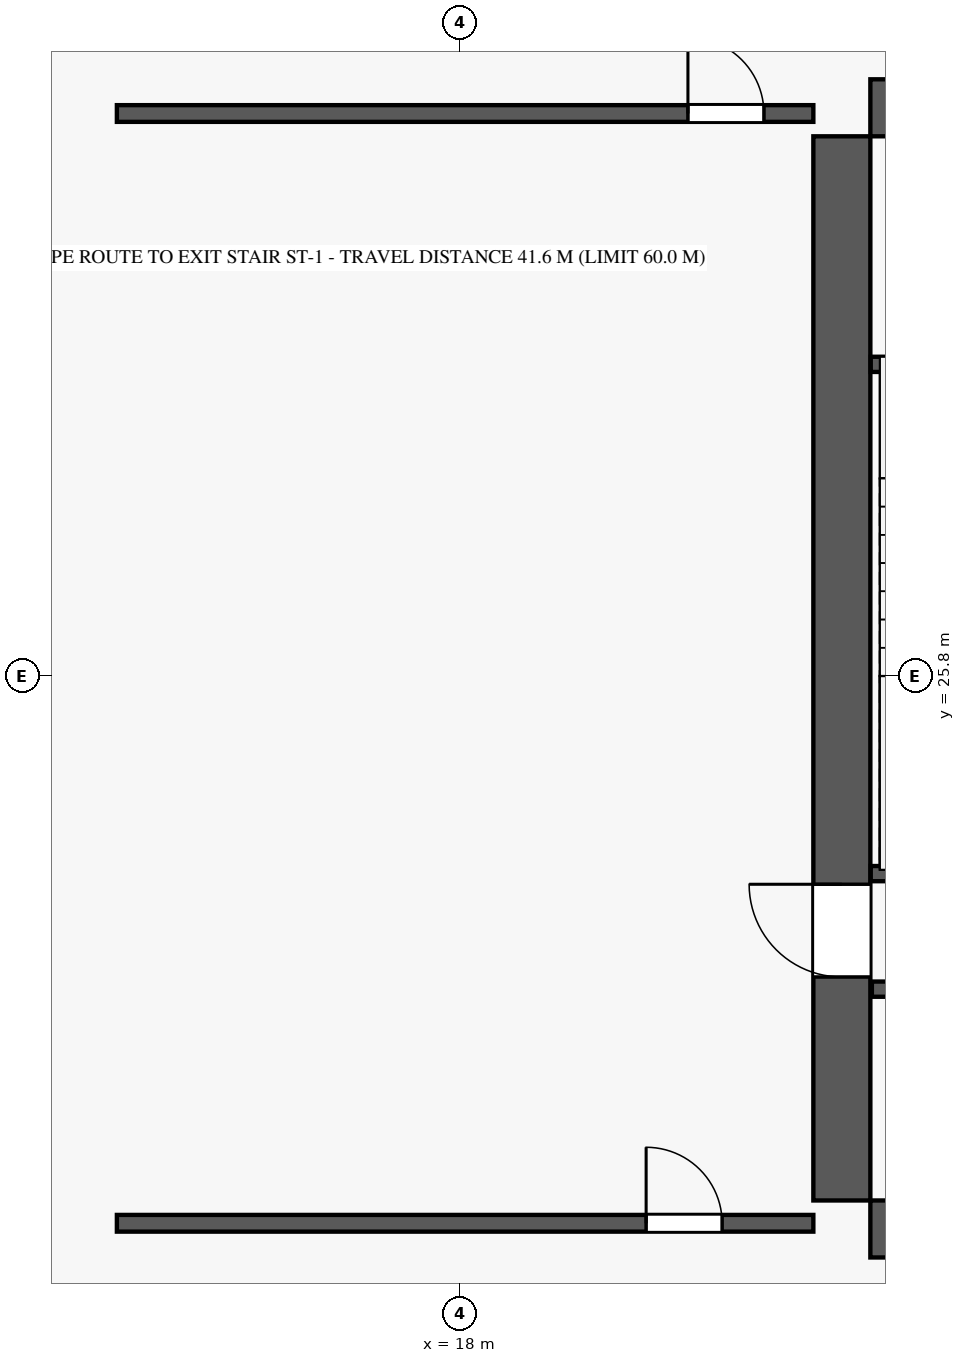
"""IFC4 building model, lengths in metres.
Left out: names, types, materials, properties, quantities, classifications, styles, units other than length and angle.
Written with IfcOpenShell. Run it as: python <this file> out.ifc"""

import sys

from ifc_helpers import new_model, si_unit, direction, frame, frame_2d, origin, origin_2d, place, context, subcontext, project, spatial, rectangle, extrude, element, fill, save


model = new_model("IFC4")
c1 = context("Model", 3, precision=1e-05, world=origin(), true_north=direction((0.0, 1.0)))
c2 = subcontext(c1, "Body", "Model", "MODEL_VIEW")
j1 = project(units=[si_unit("LENGTHUNIT", "METRE"), si_unit("PLANEANGLEUNIT", "RADIAN")], contexts=[c1])
p1 = place(None, origin())
s1 = spatial("IfcSite", under=j1, at=p1, CompositionType="ELEMENT")
p2 = place(p1, origin())
s2 = spatial("IfcBuilding", under=s1, at=p2, CompositionType="ELEMENT")
p3 = place(p2, frame((0.0, 0.0, 148.1)))
s3 = spatial("IfcBuildingStorey", under=s2, at=p3, CompositionType="ELEMENT", Elevation=148.1)
for number, where, z_axis, x_axis in (
    (1, (23.025, 18.525, 0.0), (0.0, 0.0, 1.0), (1.0, 0.0, 0.0)),
    (2, (23.025, 33.275, 0.0), (0.0, 0.0, 1.0), (1.0, 0.0, 0.0)),
):
    element("IfcColumn", number, at=place(p3, frame(where, z_axis=z_axis, x_axis=x_axis)), inside=s3, PredefinedType="COLUMN", context=c2, shape_type="SweptSolid", body=[
        extrude(rectangle(XDim=0.75, YDim=0.75, at=origin_2d()), origin(), (0.0, 0.0, 1.0), 5.4),
    ])
for number, where, z_axis, x_axis in (
    (3, (23.4, 18.525, 0.0), (0.0, 0.0, 1.0), (1.0, 0.0, 0.0)),
    (4, (23.4, 33.275, 0.0), (0.0, 0.0, 1.0), (1.0, 0.0, 0.0)),
):
    element("IfcWall", number, at=place(p3, frame(where, z_axis=z_axis, x_axis=x_axis)), inside=s3, PredefinedType="SHEAR", context=c2, shape_type="SweptSolid", body=[
        extrude(rectangle(XDim=18.0, YDim=0.75, at=frame_2d((9.0, 0.0))), origin(), (0.0, 0.0, 1.0), 5.19),
    ])
p4 = place(p3, frame((23.025, 18.9, 0.0), z_axis=(0.0, 0.0, 1.0), x_axis=(0.0, 1.0, 0.0)))
e5 = element("IfcWall", 5, at=p4, inside=s3, PredefinedType="SHEAR", context=c2, shape_type="SweptSolid", body=[
    extrude(rectangle(XDim=14.0, YDim=0.75, at=frame_2d((7.0, 0.0))), origin(), (0.0, 0.0, 1.0), 5.19),
])
p5 = place(p4, frame((2.94, 0.0, 0.0)))
e6 = element("IfcOpeningElement", 6, at=p5, cuts=e5, PredefinedType="OPENING", context=c2, shape_type="SweptSolid", body=[
    extrude(rectangle(XDim=1.22, YDim=2.25, at=frame_2d((0.61, 1.125))), frame((0.0, 0.385, 0.0), z_axis=(0.0, -1.0, 0.0), x_axis=(1.0, 0.0, 0.0)), (0.0, 0.0, 1.0), 0.77),
])
p6 = place(p3, frame((23.405, 23.2, 0.0), z_axis=(0.0, 0.0, 1.0), x_axis=(1.0, 0.0, 0.0)))
e7 = element("IfcWall", 7, at=p6, inside=s3, PredefinedType="PLUMBINGWALL", context=c2, shape_type="SweptSolid", body=[
    extrude(rectangle(XDim=3.27, YDim=0.2, at=frame_2d((1.635, 0.0))), origin(), (0.0, 0.0, 1.0), 5.19),
])
p7 = place(p3, frame((23.405, 29.9, 0.0), z_axis=(0.0, 0.0, 1.0), x_axis=(1.0, 0.0, 0.0)))
e8 = element("IfcWall", 8, at=p7, inside=s3, PredefinedType="PLUMBINGWALL", context=c2, shape_type="SweptSolid", body=[
    extrude(rectangle(XDim=3.27, YDim=0.2, at=frame_2d((1.635, 0.0))), origin(), (0.0, 0.0, 1.0), 5.19),
])
p8 = place(p7, frame((1.85, 0.0, 0.0)))
e9 = element("IfcOpeningElement", 9, at=p8, cuts=e8, PredefinedType="OPENING", context=c2, shape_type="SweptSolid", body=[
    extrude(rectangle(XDim=0.85, YDim=2.05, at=frame_2d((0.425, 1.025))), frame((0.0, 0.11, 0.0), z_axis=(0.0, -1.0, 0.0), x_axis=(1.0, 0.0, 0.0)), (0.0, 0.0, 1.0), 0.22),
])
p9 = place(p3, frame((23.42, 21.68, 0.0), z_axis=(0.0, 0.0, 1.0), x_axis=(1.0, 0.0, 0.0)))
e10 = element("IfcWall", 10, at=p9, inside=s3, PredefinedType="PLUMBINGWALL", context=c2, shape_type="SweptSolid", body=[
    extrude(rectangle(XDim=17.96, YDim=0.2, at=frame_2d((8.98, 0.0))), origin(), (0.0, 0.0, 1.0), 5.19),
])
p10 = place(p9, frame((11.6, 0.0, 0.0)))
e11 = element("IfcOpeningElement", 11, at=p10, cuts=e10, PredefinedType="OPENING", context=c2, shape_type="SweptSolid", body=[
    extrude(rectangle(XDim=1.1, YDim=2.2, at=frame_2d((0.55, 1.1))), frame((0.0, 0.11, 0.0), z_axis=(0.0, -1.0, 0.0), x_axis=(1.0, 0.0, 0.0)), (0.0, 0.0, 1.0), 0.22),
])
p11 = place(p9, frame((0.41, 0.0, 0.0)))
e12 = element("IfcOpeningElement", 12, at=p11, cuts=e10, PredefinedType="OPENING", context=c2, shape_type="SweptSolid", body=[
    extrude(rectangle(XDim=0.85, YDim=2.05, at=frame_2d((0.425, 1.025))), frame((0.0, 0.11, 0.0), z_axis=(0.0, -1.0, 0.0), x_axis=(1.0, 0.0, 0.0)), (0.0, 0.0, 1.0), 0.22),
])
p12 = place(p9, frame((6.03, 0.0, 0.0)))
e13 = element("IfcOpeningElement", 13, at=p12, cuts=e10, PredefinedType="OPENING", context=c2, shape_type="SweptSolid", body=[
    extrude(rectangle(XDim=0.85, YDim=2.05, at=frame_2d((0.425, 1.025))), frame((0.0, 0.11, 0.0), z_axis=(0.0, -1.0, 0.0), x_axis=(1.0, 0.0, 0.0)), (0.0, 0.0, 1.0), 0.22),
])
p13 = place(p9, frame((13.78, 0.0, 0.0)))
e14 = element("IfcOpeningElement", 14, at=p13, cuts=e10, PredefinedType="OPENING", context=c2, shape_type="SweptSolid", body=[
    extrude(rectangle(XDim=0.85, YDim=2.05, at=frame_2d((0.425, 1.025))), frame((0.0, 0.11, 0.0), z_axis=(0.0, -1.0, 0.0), x_axis=(1.0, 0.0, 0.0)), (0.0, 0.0, 1.0), 0.22),
])
p14 = place(p3, frame((13.487, 18.6, 0.0), z_axis=(0.0, 0.0, 1.0), x_axis=(1.0, 0.0, 0.0)))
e15 = element("IfcWall", 15, at=p14, inside=s3, PredefinedType="PARTITIONING", context=c2, shape_type="SweptSolid", body=[
    extrude(rectangle(XDim=9.163, YDim=0.22, at=frame_2d((4.582, 0.0))), origin(), (0.0, 0.0, 1.0), 4.572),
])
p15 = place(p14, frame((6.963, 0.0, 0.0)))
e16 = element("IfcOpeningElement", 16, at=p15, cuts=e15, PredefinedType="OPENING", context=c2, shape_type="SweptSolid", body=[
    extrude(rectangle(XDim=1.0, YDim=2.15, at=frame_2d((0.5, 1.075))), frame((0.0, 0.12, 0.0), z_axis=(0.0, -1.0, 0.0), x_axis=(1.0, 0.0, 0.0)), (0.0, 0.0, 1.0), 0.24),
])
p16 = place(p3, frame((13.487, 33.2, 0.0), z_axis=(0.0, 0.0, 1.0), x_axis=(1.0, 0.0, 0.0)))
e17 = element("IfcWall", 17, at=p16, inside=s3, PredefinedType="PARTITIONING", context=c2, shape_type="SweptSolid", body=[
    extrude(rectangle(XDim=9.163, YDim=0.22, at=frame_2d((4.582, 0.0))), origin(), (0.0, 0.0, 1.0), 4.572),
])
p17 = place(p16, frame((7.513, 0.0, 0.0)))
e18 = element("IfcOpeningElement", 18, at=p17, cuts=e17, PredefinedType="OPENING", context=c2, shape_type="SweptSolid", body=[
    extrude(rectangle(XDim=1.0, YDim=2.15, at=frame_2d((0.5, 1.075))), frame((0.0, 0.12, 0.0), z_axis=(0.0, -1.0, 0.0), x_axis=(1.0, 0.0, 0.0)), (0.0, 0.0, 1.0), 0.24),
])
p18 = place(p5, origin())
e19 = element("IfcDoor", 19, at=p18, inside=s3, OperationType="SINGLE_SWING_RIGHT", PredefinedType="DOOR", context=c2, shape_type="SweptSolid", body=[
    extrude(rectangle(XDim=1.22, YDim=2.25, at=frame_2d((0.61, 1.125))), frame((0.0, 0.025, 0.0), z_axis=(0.0, -1.0, 0.0), x_axis=(1.0, 0.0, 0.0)), (0.0, 0.0, 1.0), 0.05),
])
fill(e6, e19)
p19 = place(p15, origin())
e20 = element("IfcDoor", 20, at=p19, inside=s3, OperationType="SINGLE_SWING_LEFT", PredefinedType="DOOR", context=c2, shape_type="SweptSolid", body=[
    extrude(rectangle(XDim=1.0, YDim=2.15, at=frame_2d((0.5, 1.075))), frame((0.0, 0.025, 0.0), z_axis=(0.0, -1.0, 0.0), x_axis=(1.0, 0.0, 0.0)), (0.0, 0.0, 1.0), 0.05),
])
fill(e16, e20)
p20 = place(p17, origin())
e21 = element("IfcDoor", 21, at=p20, inside=s3, OperationType="SINGLE_SWING_LEFT", PredefinedType="DOOR", context=c2, shape_type="SweptSolid", body=[
    extrude(rectangle(XDim=1.0, YDim=2.15, at=frame_2d((0.5, 1.075))), frame((0.0, 0.025, 0.0), z_axis=(0.0, -1.0, 0.0), x_axis=(1.0, 0.0, 0.0)), (0.0, 0.0, 1.0), 0.05),
])
fill(e18, e21)
save(model, sys.argv[1])
